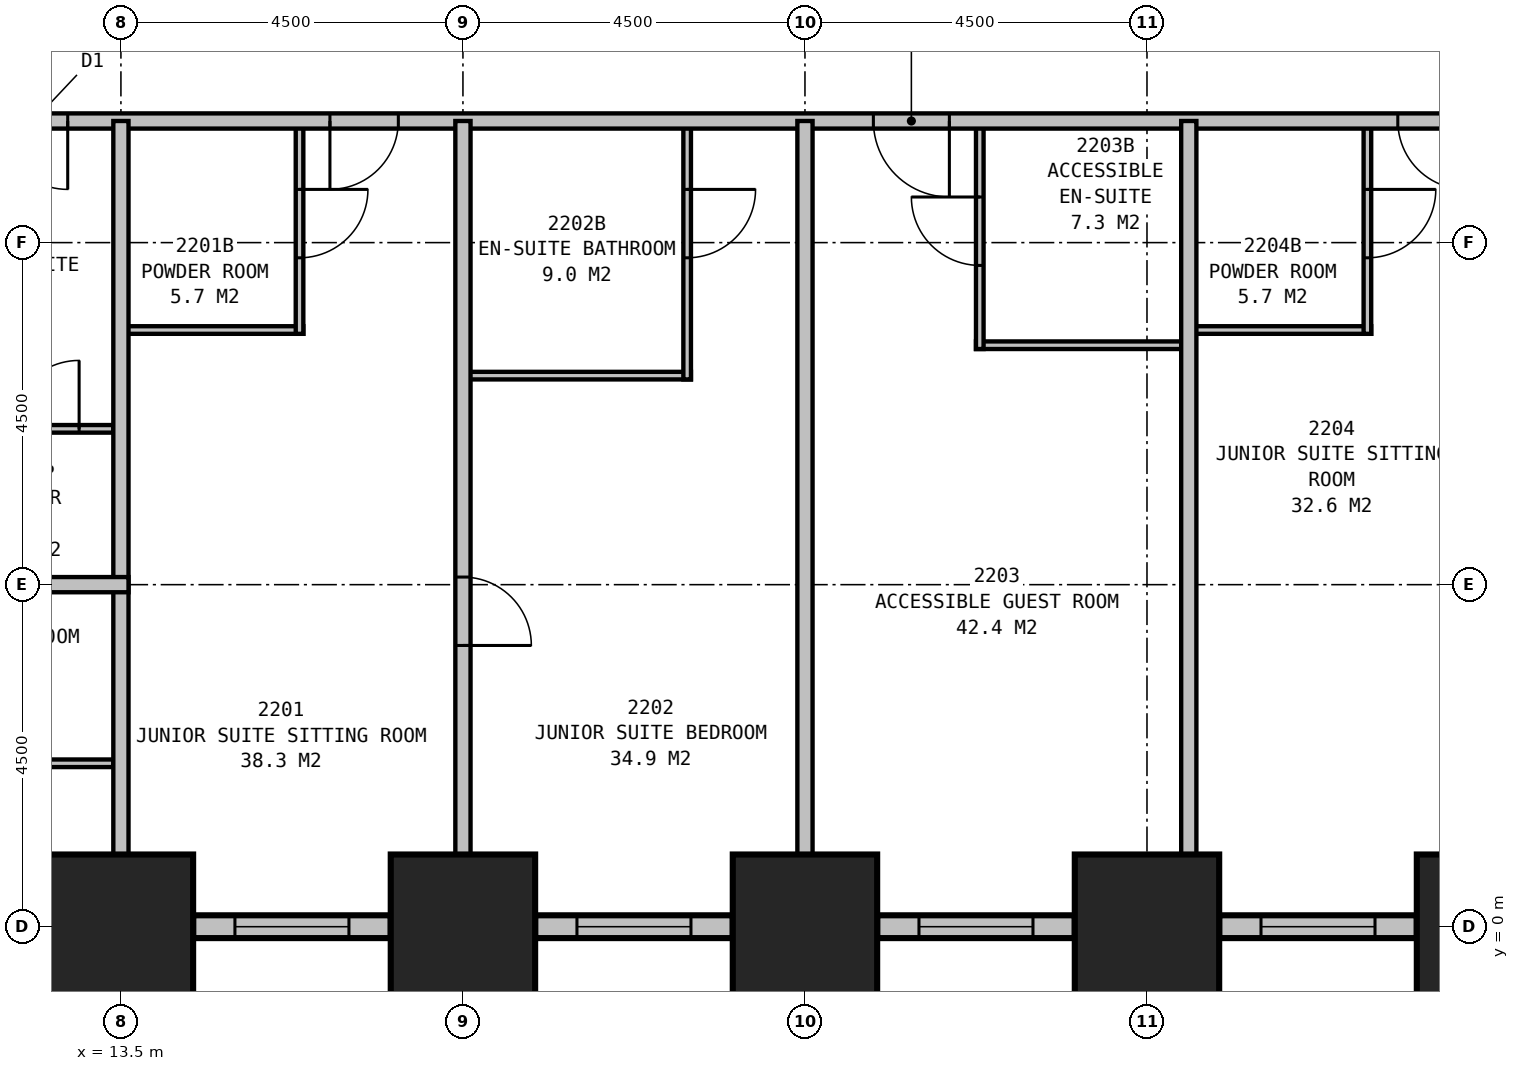
"""IFC4 building model, lengths in metres.
Left out: names, types, materials, properties, quantities, classifications, styles, units other than length and angle.
Written with IfcOpenShell. Run it as: python <this file> out.ifc"""

import sys

from ifc_helpers import new_model, si_unit, direction, frame, frame_2d, origin, origin_2d, place, context, subcontext, project, spatial, rectangle, extrude, element, fill, save


model = new_model("IFC4")
c1 = context("Model", 3, precision=1e-05, world=origin(), true_north=direction((0.0, 1.0)))
c2 = subcontext(c1, "Body", "Model", "MODEL_VIEW")
j1 = project(units=[si_unit("LENGTHUNIT", "METRE"), si_unit("PLANEANGLEUNIT", "RADIAN")], contexts=[c1])
p1 = place(None, origin())
s1 = spatial("IfcSite", under=j1, at=p1, CompositionType="ELEMENT")
p2 = place(p1, origin())
s2 = spatial("IfcBuilding", under=s1, at=p2, CompositionType="ELEMENT")
p3 = place(p2, frame((0.0, 0.0, 89.9)))
s3 = spatial("IfcBuildingStorey", under=s2, at=p3, CompositionType="ELEMENT", Elevation=89.9)
for number, where, z_axis, x_axis in (
    (1, (13.5, 0.0, 0.0), (0.0, 0.0, 1.0), (1.0, 0.0, 0.0)),
    (2, (18.0, 0.0, 0.0), (0.0, 0.0, 1.0), (1.0, 0.0, 0.0)),
    (3, (22.5, 0.0, 0.0), (0.0, 0.0, 1.0), (1.0, 0.0, 0.0)),
    (4, (27.0, 0.0, 0.0), (0.0, 0.0, 1.0), (1.0, 0.0, 0.0)),
    (5, (31.5, 0.0, 0.0), (0.0, 0.0, 1.0), (1.0, 0.0, 0.0)),
):
    element("IfcColumn", number, at=place(p3, frame(where, z_axis=z_axis, x_axis=x_axis)), inside=s3, PredefinedType="COLUMN", context=c2, shape_type="SweptSolid", body=[
        extrude(rectangle(XDim=1.9, YDim=1.9, at=origin_2d()), origin(), (0.0, 0.0, 1.0), 3.5),
    ])
p4 = place(p3, frame((14.45, 0.0, 0.0), z_axis=(0.0, 0.0, 1.0), x_axis=(1.0, 0.0, 0.0)))
e6 = element("IfcWall", 6, at=p4, inside=s3, PredefinedType="STANDARD", context=c2, shape_type="SweptSolid", body=[
    extrude(rectangle(XDim=2.6, YDim=0.3, at=frame_2d((1.3, 0.0))), origin(), (0.0, 0.0, 1.0), 2.15),
])
p5 = place(p4, frame((0.55, 0.0, 0.5)))
e7 = element("IfcOpeningElement", 7, at=p5, cuts=e6, PredefinedType="OPENING", context=c2, shape_type="SweptSolid", body=[
    extrude(rectangle(XDim=1.5, YDim=1.5, at=frame_2d((0.75, 0.75))), frame((0.0, 0.16, 0.0), z_axis=(0.0, -1.0, 0.0), x_axis=(1.0, 0.0, 0.0)), (0.0, 0.0, 1.0), 0.32),
])
p6 = place(p3, frame((18.95, 0.0, 0.0), z_axis=(0.0, 0.0, 1.0), x_axis=(1.0, 0.0, 0.0)))
e8 = element("IfcWall", 8, at=p6, inside=s3, PredefinedType="STANDARD", context=c2, shape_type="SweptSolid", body=[
    extrude(rectangle(XDim=2.6, YDim=0.3, at=frame_2d((1.3, 0.0))), origin(), (0.0, 0.0, 1.0), 2.15),
])
p7 = place(p6, frame((0.55, 0.0, 0.5)))
e9 = element("IfcOpeningElement", 9, at=p7, cuts=e8, PredefinedType="OPENING", context=c2, shape_type="SweptSolid", body=[
    extrude(rectangle(XDim=1.5, YDim=1.5, at=frame_2d((0.75, 0.75))), frame((0.0, 0.16, 0.0), z_axis=(0.0, -1.0, 0.0), x_axis=(1.0, 0.0, 0.0)), (0.0, 0.0, 1.0), 0.32),
])
p8 = place(p3, frame((23.45, 0.0, 0.0), z_axis=(0.0, 0.0, 1.0), x_axis=(1.0, 0.0, 0.0)))
e10 = element("IfcWall", 10, at=p8, inside=s3, PredefinedType="STANDARD", context=c2, shape_type="SweptSolid", body=[
    extrude(rectangle(XDim=2.6, YDim=0.3, at=frame_2d((1.3, 0.0))), origin(), (0.0, 0.0, 1.0), 2.15),
])
p9 = place(p8, frame((0.55, 0.0, 0.5)))
e11 = element("IfcOpeningElement", 11, at=p9, cuts=e10, PredefinedType="OPENING", context=c2, shape_type="SweptSolid", body=[
    extrude(rectangle(XDim=1.5, YDim=1.5, at=frame_2d((0.75, 0.75))), frame((0.0, 0.16, 0.0), z_axis=(0.0, -1.0, 0.0), x_axis=(1.0, 0.0, 0.0)), (0.0, 0.0, 1.0), 0.32),
])
p10 = place(p3, frame((27.95, 0.0, 0.0), z_axis=(0.0, 0.0, 1.0), x_axis=(1.0, 0.0, 0.0)))
e12 = element("IfcWall", 12, at=p10, inside=s3, PredefinedType="STANDARD", context=c2, shape_type="SweptSolid", body=[
    extrude(rectangle(XDim=2.6, YDim=0.3, at=frame_2d((1.3, 0.0))), origin(), (0.0, 0.0, 1.0), 2.15),
])
p11 = place(p10, frame((0.55, 0.0, 0.5)))
e13 = element("IfcOpeningElement", 13, at=p11, cuts=e12, PredefinedType="OPENING", context=c2, shape_type="SweptSolid", body=[
    extrude(rectangle(XDim=1.5, YDim=1.5, at=frame_2d((0.75, 0.75))), frame((0.0, 0.16, 0.0), z_axis=(0.0, -1.0, 0.0), x_axis=(1.0, 0.0, 0.0)), (0.0, 0.0, 1.0), 0.32),
])
p12 = place(p3, frame((11.2, 10.6, 0.0), z_axis=(0.0, 0.0, 1.0), x_axis=(1.0, 0.0, 0.0)))
e14 = element("IfcWall", 14, at=p12, inside=s3, PredefinedType="PARTITIONING", context=c2, shape_type="SweptSolid", body=[
    extrude(rectangle(XDim=27.1, YDim=0.2, at=frame_2d((13.55, 0.0))), origin(), (0.0, 0.0, 1.0), 3.25),
])
p13 = place(p12, frame((5.95, 0.0, 0.0), z_axis=(0.0, 0.0, 1.0), x_axis=(-1.0, 0.0, 0.0)))
e15 = element("IfcOpeningElement", 15, at=p13, cuts=e14, PredefinedType="OPENING", context=c2, shape_type="SweptSolid", body=[
    extrude(rectangle(XDim=0.9, YDim=2.1, at=frame_2d((0.45, 1.05))), frame((0.0, 0.11, 0.0), z_axis=(0.0, -1.0, 0.0), x_axis=(1.0, 0.0, 0.0)), (0.0, 0.0, 1.0), 0.22),
])
p14 = place(p12, frame((13.2, 0.0, 0.0), z_axis=(0.0, 0.0, 1.0), x_axis=(-1.0, 0.0, 0.0)))
e16 = element("IfcOpeningElement", 16, at=p14, cuts=e14, PredefinedType="OPENING", context=c2, shape_type="SweptSolid", body=[
    extrude(rectangle(XDim=1.0, YDim=2.1, at=frame_2d((0.5, 1.05))), frame((0.0, 0.11, 0.0), z_axis=(0.0, -1.0, 0.0), x_axis=(1.0, 0.0, 0.0)), (0.0, 0.0, 1.0), 0.22),
])
p15 = place(p12, frame((20.0, 0.0, 0.0), z_axis=(0.0, 0.0, 1.0), x_axis=(-1.0, 0.0, 0.0)))
e17 = element("IfcOpeningElement", 17, at=p15, cuts=e14, PredefinedType="OPENING", context=c2, shape_type="SweptSolid", body=[
    extrude(rectangle(XDim=0.9, YDim=2.1, at=frame_2d((0.45, 1.05))), frame((0.0, 0.11, 0.0), z_axis=(0.0, -1.0, 0.0), x_axis=(1.0, 0.0, 0.0)), (0.0, 0.0, 1.0), 0.22),
])
p16 = place(p12, frame((1.6, 0.0, 0.0), z_axis=(0.0, 0.0, 1.0), x_axis=(-1.0, 0.0, 0.0)))
e18 = element("IfcOpeningElement", 18, at=p16, cuts=e14, PredefinedType="OPENING", context=c2, shape_type="SweptSolid", body=[
    extrude(rectangle(XDim=0.9, YDim=2.1, at=frame_2d((0.45, 1.05))), frame((0.0, 0.11, 0.0), z_axis=(0.0, -1.0, 0.0), x_axis=(1.0, 0.0, 0.0)), (0.0, 0.0, 1.0), 0.22),
])
p17 = place(p12, frame((26.4, 0.0, 0.0), z_axis=(0.0, 0.0, 1.0), x_axis=(-1.0, 0.0, 0.0)))
e19 = element("IfcOpeningElement", 19, at=p17, cuts=e14, PredefinedType="OPENING", context=c2, shape_type="SweptSolid", body=[
    extrude(rectangle(XDim=0.9, YDim=2.1, at=frame_2d((0.45, 1.05))), frame((0.0, 0.11, 0.0), z_axis=(0.0, -1.0, 0.0), x_axis=(1.0, 0.0, 0.0)), (0.0, 0.0, 1.0), 0.22),
])
p18 = place(p3, frame((18.0, 10.6, 0.0), z_axis=(0.0, 0.0, 1.0), x_axis=(0.0, -1.0, 0.0)))
e20 = element("IfcWall", 20, at=p18, inside=s3, PredefinedType="PARTITIONING", context=c2, shape_type="SweptSolid", body=[
    extrude(rectangle(XDim=10.6, YDim=0.2, at=frame_2d((5.3, 0.0))), origin(), (0.0, 0.0, 1.0), 2.25),
])
p19 = place(p18, frame((6.0, 0.0, 0.0)))
e21 = element("IfcOpeningElement", 21, at=p19, cuts=e20, PredefinedType="OPENING", context=c2, shape_type="SweptSolid", body=[
    extrude(rectangle(XDim=0.9, YDim=2.1, at=frame_2d((0.45, 1.05))), frame((0.0, 0.11, 0.0), z_axis=(0.0, -1.0, 0.0), x_axis=(1.0, 0.0, 0.0)), (0.0, 0.0, 1.0), 0.22),
])
for number, where, z_axis, x_axis in (
    (22, (22.5, 10.6, 0.0), (0.0, 0.0, 1.0), (0.0, -1.0, 0.0)),
    (23, (27.55, 10.6, 0.0), (0.0, 0.0, 1.0), (0.0, -1.0, 0.0)),
):
    element("IfcWall", number, at=place(p3, frame(where, z_axis=z_axis, x_axis=x_axis)), inside=s3, PredefinedType="PARTITIONING", context=c2, shape_type="SweptSolid", body=[
        extrude(rectangle(XDim=10.6, YDim=0.2, at=frame_2d((5.3, 0.0))), origin(), (0.0, 0.0, 1.0), 2.25),
    ])
p20 = place(p3, frame((13.5, 7.85, 0.0), z_axis=(0.0, 0.0, 1.0), x_axis=(1.0, 0.0, 0.0)))
e24 = element("IfcWall", 24, at=p20, inside=s3, PredefinedType="PLUMBINGWALL", context=c2, shape_type="SweptSolid", body=[
    extrude(rectangle(XDim=2.4, YDim=0.1, at=frame_2d((1.2, 0.0))), origin(), (0.0, 0.0, 1.0), 3.25),
])
p21 = place(p3, frame((15.85, 10.6, 0.0), z_axis=(0.0, 0.0, 1.0), x_axis=(0.0, -1.0, 0.0)))
e25 = element("IfcWall", 25, at=p21, inside=s3, PredefinedType="PLUMBINGWALL", context=c2, shape_type="SweptSolid", body=[
    extrude(rectangle(XDim=2.8, YDim=0.1, at=frame_2d((1.4, 0.0))), origin(), (0.0, 0.0, 1.0), 3.25),
])
p22 = place(p21, frame((0.9, 0.0, 0.0)))
e26 = element("IfcOpeningElement", 26, at=p22, cuts=e25, PredefinedType="OPENING", context=c2, shape_type="SweptSolid", body=[
    extrude(rectangle(XDim=0.9, YDim=2.1, at=frame_2d((0.45, 1.05))), frame((0.0, 0.06, 0.0), z_axis=(0.0, -1.0, 0.0), x_axis=(1.0, 0.0, 0.0)), (0.0, 0.0, 1.0), 0.12),
])
p23 = place(p3, frame((18.0, 7.25, 0.0), z_axis=(0.0, 0.0, 1.0), x_axis=(1.0, 0.0, 0.0)))
e27 = element("IfcWall", 27, at=p23, inside=s3, PredefinedType="PLUMBINGWALL", context=c2, shape_type="SweptSolid", body=[
    extrude(rectangle(XDim=3.0, YDim=0.1, at=frame_2d((1.5, 0.0))), origin(), (0.0, 0.0, 1.0), 3.25),
])
p24 = place(p3, frame((20.95, 10.6, 0.0), z_axis=(0.0, 0.0, 1.0), x_axis=(0.0, -1.0, 0.0)))
e28 = element("IfcWall", 28, at=p24, inside=s3, PredefinedType="PLUMBINGWALL", context=c2, shape_type="SweptSolid", body=[
    extrude(rectangle(XDim=3.4, YDim=0.1, at=frame_2d((1.7, 0.0))), origin(), (0.0, 0.0, 1.0), 3.25),
])
p25 = place(p24, frame((0.9, 0.0, 0.0)))
e29 = element("IfcOpeningElement", 29, at=p25, cuts=e28, PredefinedType="OPENING", context=c2, shape_type="SweptSolid", body=[
    extrude(rectangle(XDim=0.9, YDim=2.1, at=frame_2d((0.45, 1.05))), frame((0.0, 0.06, 0.0), z_axis=(0.0, -1.0, 0.0), x_axis=(1.0, 0.0, 0.0)), (0.0, 0.0, 1.0), 0.12),
])
p26 = place(p3, frame((24.75, 7.65, 0.0), z_axis=(0.0, 0.0, 1.0), x_axis=(1.0, 0.0, 0.0)))
e30 = element("IfcWall", 30, at=p26, inside=s3, PredefinedType="PLUMBINGWALL", context=c2, shape_type="SweptSolid", body=[
    extrude(rectangle(XDim=2.8, YDim=0.1, at=frame_2d((1.4, 0.0))), origin(), (0.0, 0.0, 1.0), 3.25),
])
p27 = place(p3, frame((24.8, 10.6, 0.0), z_axis=(0.0, 0.0, 1.0), x_axis=(0.0, -1.0, 0.0)))
e31 = element("IfcWall", 31, at=p27, inside=s3, PredefinedType="PLUMBINGWALL", context=c2, shape_type="SweptSolid", body=[
    extrude(rectangle(XDim=3.0, YDim=0.1, at=frame_2d((1.5, 0.0))), origin(), (0.0, 0.0, 1.0), 3.25),
])
p28 = place(p27, frame((1.9, 0.0, 0.0), z_axis=(0.0, 0.0, 1.0), x_axis=(-1.0, 0.0, 0.0)))
e32 = element("IfcOpeningElement", 32, at=p28, cuts=e31, PredefinedType="OPENING", context=c2, shape_type="SweptSolid", body=[
    extrude(rectangle(XDim=0.9, YDim=2.1, at=frame_2d((0.45, 1.05))), frame((0.0, 0.06, 0.0), z_axis=(0.0, -1.0, 0.0), x_axis=(1.0, 0.0, 0.0)), (0.0, 0.0, 1.0), 0.12),
])
p29 = place(p3, frame((27.55, 7.85, 0.0), z_axis=(0.0, 0.0, 1.0), x_axis=(1.0, 0.0, 0.0)))
e33 = element("IfcWall", 33, at=p29, inside=s3, PredefinedType="PLUMBINGWALL", context=c2, shape_type="SweptSolid", body=[
    extrude(rectangle(XDim=2.4, YDim=0.1, at=frame_2d((1.2, 0.0))), origin(), (0.0, 0.0, 1.0), 3.25),
])
p30 = place(p3, frame((29.9, 10.6, 0.0), z_axis=(0.0, 0.0, 1.0), x_axis=(0.0, -1.0, 0.0)))
e34 = element("IfcWall", 34, at=p30, inside=s3, PredefinedType="PLUMBINGWALL", context=c2, shape_type="SweptSolid", body=[
    extrude(rectangle(XDim=2.8, YDim=0.1, at=frame_2d((1.4, 0.0))), origin(), (0.0, 0.0, 1.0), 3.25),
])
p31 = place(p30, frame((0.9, 0.0, 0.0)))
e35 = element("IfcOpeningElement", 35, at=p31, cuts=e34, PredefinedType="OPENING", context=c2, shape_type="SweptSolid", body=[
    extrude(rectangle(XDim=0.9, YDim=2.1, at=frame_2d((0.45, 1.05))), frame((0.0, 0.06, 0.0), z_axis=(0.0, -1.0, 0.0), x_axis=(1.0, 0.0, 0.0)), (0.0, 0.0, 1.0), 0.12),
])
p32 = place(p3, frame((13.5, 10.6, 0.0), z_axis=(0.0, 0.0, 1.0), x_axis=(0.0, -1.0, 0.0)))
e36 = element("IfcWall", 36, at=p32, inside=s3, PredefinedType="PARTITIONING", context=c2, shape_type="SweptSolid", body=[
    extrude(rectangle(XDim=10.6, YDim=0.2, at=frame_2d((5.3, 0.0))), origin(), (0.0, 0.0, 1.0), 2.25),
])
p33 = place(p3, frame((13.6, 4.5, 0.0), z_axis=(0.0, 0.0, 1.0), x_axis=(-1.0, 0.0, 0.0)))
e37 = element("IfcWall", 37, at=p33, inside=s3, PredefinedType="PARTITIONING", context=c2, shape_type="SweptSolid", body=[
    extrude(rectangle(XDim=9.1, YDim=0.2, at=frame_2d((4.55, 0.0))), origin(), (0.0, 0.0, 1.0), 3.25),
])
p34 = place(p33, frame((7.1, 0.0, 0.0)))
e38 = element("IfcOpeningElement", 38, at=p34, cuts=e37, PredefinedType="OPENING", context=c2, shape_type="SweptSolid", body=[
    extrude(rectangle(XDim=0.9, YDim=2.1, at=frame_2d((0.45, 1.05))), frame((0.0, 0.11, 0.0), z_axis=(0.0, -1.0, 0.0), x_axis=(1.0, 0.0, 0.0)), (0.0, 0.0, 1.0), 0.22),
])
p35 = place(p3, frame((13.4, 6.55, 0.0), z_axis=(0.0, 0.0, 1.0), x_axis=(-1.0, 0.0, 0.0)))
e39 = element("IfcWall", 39, at=p35, inside=s3, PredefinedType="PLUMBINGWALL", context=c2, shape_type="SweptSolid", body=[
    extrude(rectangle(XDim=1.8, YDim=0.1, at=frame_2d((0.9, 0.0))), origin(), (0.0, 0.0, 1.0), 3.25),
])
p36 = place(p35, frame((1.35, 0.0, 0.0), z_axis=(0.0, 0.0, 1.0), x_axis=(-1.0, 0.0, 0.0)))
e40 = element("IfcOpeningElement", 40, at=p36, cuts=e39, PredefinedType="OPENING", context=c2, shape_type="SweptSolid", body=[
    extrude(rectangle(XDim=0.9, YDim=2.1, at=frame_2d((0.45, 1.05))), frame((0.0, 0.06, 0.0), z_axis=(0.0, -1.0, 0.0), x_axis=(1.0, 0.0, 0.0)), (0.0, 0.0, 1.0), 0.12),
])
p37 = place(p3, frame((13.4, 2.15, 0.0), z_axis=(0.0, 0.0, 1.0), x_axis=(-1.0, 0.0, 0.0)))
e41 = element("IfcWall", 41, at=p37, inside=s3, PredefinedType="PLUMBINGWALL", context=c2, shape_type="SweptSolid", body=[
    extrude(rectangle(XDim=3.3, YDim=0.1, at=frame_2d((1.65, 0.0))), origin(), (0.0, 0.0, 1.0), 3.25),
])
p38 = place(p37, frame((0.9, 0.0, 0.0)))
e42 = element("IfcOpeningElement", 42, at=p38, cuts=e41, PredefinedType="OPENING", context=c2, shape_type="SweptSolid", body=[
    extrude(rectangle(XDim=0.9, YDim=2.1, at=frame_2d((0.45, 1.05))), frame((0.0, 0.06, 0.0), z_axis=(0.0, -1.0, 0.0), x_axis=(1.0, 0.0, 0.0)), (0.0, 0.0, 1.0), 0.12),
])
p39 = place(p5, origin())
e43 = element("IfcWindow", 43, at=p39, inside=s3, PartitioningType="SINGLE_PANEL", PredefinedType="WINDOW", context=c2, shape_type="SweptSolid", body=[
    extrude(rectangle(XDim=1.5, YDim=1.5, at=frame_2d((0.75, 0.75))), frame((0.0, 0.03, 0.0), z_axis=(0.0, -1.0, 0.0), x_axis=(1.0, 0.0, 0.0)), (0.0, 0.0, 1.0), 0.06),
])
fill(e7, e43)
p40 = place(p7, origin())
e44 = element("IfcWindow", 44, at=p40, inside=s3, PartitioningType="SINGLE_PANEL", PredefinedType="WINDOW", context=c2, shape_type="SweptSolid", body=[
    extrude(rectangle(XDim=1.5, YDim=1.5, at=frame_2d((0.75, 0.75))), frame((0.0, 0.03, 0.0), z_axis=(0.0, -1.0, 0.0), x_axis=(1.0, 0.0, 0.0)), (0.0, 0.0, 1.0), 0.06),
])
fill(e9, e44)
p41 = place(p9, origin())
e45 = element("IfcWindow", 45, at=p41, inside=s3, PartitioningType="SINGLE_PANEL", PredefinedType="WINDOW", context=c2, shape_type="SweptSolid", body=[
    extrude(rectangle(XDim=1.5, YDim=1.5, at=frame_2d((0.75, 0.75))), frame((0.0, 0.03, 0.0), z_axis=(0.0, -1.0, 0.0), x_axis=(1.0, 0.0, 0.0)), (0.0, 0.0, 1.0), 0.06),
])
fill(e11, e45)
p42 = place(p11, origin())
e46 = element("IfcWindow", 46, at=p42, inside=s3, PartitioningType="SINGLE_PANEL", PredefinedType="WINDOW", context=c2, shape_type="SweptSolid", body=[
    extrude(rectangle(XDim=1.5, YDim=1.5, at=frame_2d((0.75, 0.75))), frame((0.0, 0.03, 0.0), z_axis=(0.0, -1.0, 0.0), x_axis=(1.0, 0.0, 0.0)), (0.0, 0.0, 1.0), 0.06),
])
fill(e13, e46)
p43 = place(p13, origin())
e47 = element("IfcDoor", 47, at=p43, inside=s3, OperationType="SINGLE_SWING_RIGHT", PredefinedType="DOOR", context=c2, shape_type="SweptSolid", body=[
    extrude(rectangle(XDim=0.9, YDim=2.1, at=frame_2d((0.45, 1.05))), frame((0.0, 0.025, 0.0), z_axis=(0.0, -1.0, 0.0), x_axis=(1.0, 0.0, 0.0)), (0.0, 0.0, 1.0), 0.05),
])
fill(e15, e47)
p44 = place(p14, origin())
e48 = element("IfcDoor", 48, at=p44, inside=s3, OperationType="SINGLE_SWING_LEFT", PredefinedType="DOOR", context=c2, shape_type="SweptSolid", body=[
    extrude(rectangle(XDim=1.0, YDim=2.1, at=frame_2d((0.5, 1.05))), frame((0.0, 0.025, 0.0), z_axis=(0.0, -1.0, 0.0), x_axis=(1.0, 0.0, 0.0)), (0.0, 0.0, 1.0), 0.05),
])
fill(e16, e48)
p45 = place(p15, origin())
e49 = element("IfcDoor", 49, at=p45, inside=s3, OperationType="SINGLE_SWING_LEFT", PredefinedType="DOOR", context=c2, shape_type="SweptSolid", body=[
    extrude(rectangle(XDim=0.9, YDim=2.1, at=frame_2d((0.45, 1.05))), frame((0.0, 0.025, 0.0), z_axis=(0.0, -1.0, 0.0), x_axis=(1.0, 0.0, 0.0)), (0.0, 0.0, 1.0), 0.05),
])
fill(e17, e49)
p46 = place(p16, origin())
e50 = element("IfcDoor", 50, at=p46, inside=s3, OperationType="SINGLE_SWING_LEFT", PredefinedType="DOOR", context=c2, shape_type="SweptSolid", body=[
    extrude(rectangle(XDim=0.9, YDim=2.1, at=frame_2d((0.45, 1.05))), frame((0.0, 0.025, 0.0), z_axis=(0.0, -1.0, 0.0), x_axis=(1.0, 0.0, 0.0)), (0.0, 0.0, 1.0), 0.05),
])
fill(e18, e50)
p47 = place(p19, origin())
e51 = element("IfcDoor", 51, at=p47, inside=s3, OperationType="SINGLE_SWING_RIGHT", PredefinedType="DOOR", context=c2, shape_type="SweptSolid", body=[
    extrude(rectangle(XDim=0.9, YDim=2.1, at=frame_2d((0.45, 1.05))), frame((0.0, 0.025, 0.0), z_axis=(0.0, -1.0, 0.0), x_axis=(1.0, 0.0, 0.0)), (0.0, 0.0, 1.0), 0.05),
])
fill(e21, e51)
p48 = place(p22, origin())
e52 = element("IfcDoor", 52, at=p48, inside=s3, OperationType="SINGLE_SWING_LEFT", PredefinedType="DOOR", context=c2, shape_type="SweptSolid", body=[
    extrude(rectangle(XDim=0.9, YDim=2.1, at=frame_2d((0.45, 1.05))), frame((0.0, 0.025, 0.0), z_axis=(0.0, -1.0, 0.0), x_axis=(1.0, 0.0, 0.0)), (0.0, 0.0, 1.0), 0.05),
])
fill(e26, e52)
p49 = place(p25, origin())
e53 = element("IfcDoor", 53, at=p49, inside=s3, OperationType="SINGLE_SWING_LEFT", PredefinedType="DOOR", context=c2, shape_type="SweptSolid", body=[
    extrude(rectangle(XDim=0.9, YDim=2.1, at=frame_2d((0.45, 1.05))), frame((0.0, 0.025, 0.0), z_axis=(0.0, -1.0, 0.0), x_axis=(1.0, 0.0, 0.0)), (0.0, 0.0, 1.0), 0.05),
])
fill(e29, e53)
p50 = place(p28, origin())
e54 = element("IfcDoor", 54, at=p50, inside=s3, OperationType="SINGLE_SWING_RIGHT", PredefinedType="DOOR", context=c2, shape_type="SweptSolid", body=[
    extrude(rectangle(XDim=0.9, YDim=2.1, at=frame_2d((0.45, 1.05))), frame((0.0, 0.025, 0.0), z_axis=(0.0, -1.0, 0.0), x_axis=(1.0, 0.0, 0.0)), (0.0, 0.0, 1.0), 0.05),
])
fill(e32, e54)
p51 = place(p31, origin())
e55 = element("IfcDoor", 55, at=p51, inside=s3, OperationType="SINGLE_SWING_LEFT", PredefinedType="DOOR", context=c2, shape_type="SweptSolid", body=[
    extrude(rectangle(XDim=0.9, YDim=2.1, at=frame_2d((0.45, 1.05))), frame((0.0, 0.025, 0.0), z_axis=(0.0, -1.0, 0.0), x_axis=(1.0, 0.0, 0.0)), (0.0, 0.0, 1.0), 0.05),
])
fill(e35, e55)
p52 = place(p36, origin())
e56 = element("IfcDoor", 56, at=p52, inside=s3, OperationType="SINGLE_SWING_RIGHT", PredefinedType="DOOR", context=c2, shape_type="SweptSolid", body=[
    extrude(rectangle(XDim=0.9, YDim=2.1, at=frame_2d((0.45, 1.05))), frame((0.0, 0.025, 0.0), z_axis=(0.0, -1.0, 0.0), x_axis=(1.0, 0.0, 0.0)), (0.0, 0.0, 1.0), 0.05),
])
fill(e40, e56)
save(model, sys.argv[1])
